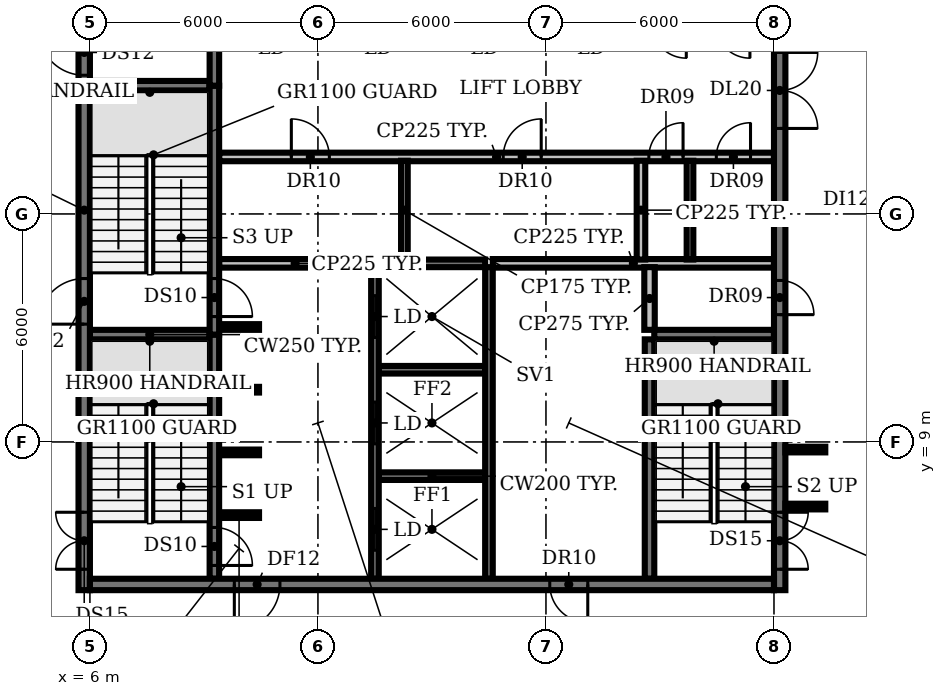
"""IFC4 building model, lengths in metres.
Left out: names, types, materials, properties, quantities, classifications, styles, units other than length and angle.
Written with IfcOpenShell. Run it as: python <this file> out.ifc"""

import sys

from ifc_helpers import new_model, si_unit, direction, frame, frame_2d, origin, place, context, subcontext, project, spatial, rectangle, extrude, element, fill, save


model = new_model("IFC4")
c1 = context("Model", 3, precision=1e-05, world=origin(), true_north=direction((0.0, 1.0)))
c2 = subcontext(c1, "Body", "Model", "MODEL_VIEW")
j1 = project(units=[si_unit("LENGTHUNIT", "METRE"), si_unit("PLANEANGLEUNIT", "RADIAN")], contexts=[c1])
p1 = place(None, origin())
s1 = spatial("IfcSite", under=j1, at=p1, CompositionType="ELEMENT")
p2 = place(p1, origin())
s2 = spatial("IfcBuilding", under=s1, at=p2, CompositionType="ELEMENT")
p3 = place(p2, frame((0.0, 0.0, 297.8)))
s3 = spatial("IfcBuildingStorey", under=s2, at=p3, CompositionType="ELEMENT", Elevation=297.8)
p4 = place(p3, frame((9.4, 7.075, 0.0), z_axis=(0.0, 0.0, 1.0), x_axis=(1.0, 0.0, 0.0)))
e1 = element("IfcWall", 1, at=p4, inside=s3, PredefinedType="SHEAR", context=c2, shape_type="SweptSolid", body=[
    extrude(rectangle(XDim=1.05, YDim=0.15, at=frame_2d((0.525, 0.0))), origin(), (0.0, 0.0, 1.0), 3.85),
])
p5 = place(p3, frame((13.6, 8.1, 0.0), z_axis=(0.0, 0.0, 1.0), x_axis=(1.0, 0.0, 0.0)))
e2 = element("IfcWall", 2, at=p5, inside=s3, PredefinedType="SHEAR", context=c2, shape_type="SweptSolid", body=[
    extrude(rectangle(XDim=2.8, YDim=0.2, at=frame_2d((1.4, 0.0))), origin(), (0.0, 0.0, 1.0), 3.85),
])
for number, where, z_axis, x_axis in (
    (3, (9.4, 8.725, 0.0), (0.0, 0.0, 1.0), (1.0, 0.0, 0.0)),
    (4, (9.4, 10.375, 0.0), (0.0, 0.0, 1.0), (1.0, 0.0, 0.0)),
):
    element("IfcWall", number, at=place(p3, frame(where, z_axis=z_axis, x_axis=x_axis)), inside=s3, PredefinedType="SHEAR", context=c2, shape_type="SweptSolid", body=[
        extrude(rectangle(XDim=1.05, YDim=0.15, at=frame_2d((0.525, 0.0))), origin(), (0.0, 0.0, 1.0), 3.85),
    ])
p6 = place(p3, frame((13.6, 10.9, 0.0), z_axis=(0.0, 0.0, 1.0), x_axis=(1.0, 0.0, 0.0)))
e5 = element("IfcWall", 5, at=p6, inside=s3, PredefinedType="SHEAR", context=c2, shape_type="SweptSolid", body=[
    extrude(rectangle(XDim=2.8, YDim=0.2, at=frame_2d((1.4, 0.0))), origin(), (0.0, 0.0, 1.0), 3.85),
])
for number, where, z_axis, x_axis in (
    (6, (6.0, 11.825, 0.0), (0.0, 0.0, 1.0), (1.0, 0.0, 0.0)),
    (7, (20.85, 11.825, 0.0), (0.0, 0.0, 1.0), (1.0, 0.0, 0.0)),
):
    element("IfcWall", number, at=place(p3, frame(where, z_axis=z_axis, x_axis=x_axis)), inside=s3, PredefinedType="SHEAR", context=c2, shape_type="SweptSolid", body=[
        extrude(rectangle(XDim=3.15, YDim=0.25, at=frame_2d((1.575, 0.0))), origin(), (0.0, 0.0, 1.0), 3.85),
    ])
p7 = place(p3, frame((9.4, 12.025, 0.0), z_axis=(0.0, 0.0, 1.0), x_axis=(1.0, 0.0, 0.0)))
e8 = element("IfcWall", 8, at=p7, inside=s3, PredefinedType="SHEAR", context=c2, shape_type="SweptSolid", body=[
    extrude(rectangle(XDim=1.05, YDim=0.15, at=frame_2d((0.525, 0.0))), origin(), (0.0, 0.0, 1.0), 3.85),
])
p8 = place(p3, frame((9.4, 13.7, 0.0), z_axis=(0.0, 0.0, 1.0), x_axis=(1.0, 0.0, 0.0)))
e9 = element("IfcWall", 9, at=p8, inside=s3, PredefinedType="PARTITIONING", context=c2, shape_type="SweptSolid", body=[
    extrude(rectangle(XDim=4.0, YDim=0.225, at=frame_2d((2.0, 0.0))), origin(), (0.0, 0.0, 1.0), 3.85),
])
p9 = place(p3, frame((13.6, 13.7, 0.0), z_axis=(0.0, 0.0, 1.0), x_axis=(1.0, 0.0, 0.0)))
e10 = element("IfcWall", 10, at=p9, inside=s3, PredefinedType="SHEAR", context=c2, shape_type="SweptSolid", body=[
    extrude(rectangle(XDim=2.8, YDim=0.2, at=frame_2d((1.4, 0.0))), origin(), (0.0, 0.0, 1.0), 3.85),
])
p10 = place(p3, frame((16.6, 13.7, 0.0), z_axis=(0.0, 0.0, 1.0), x_axis=(1.0, 0.0, 0.0)))
e11 = element("IfcWall", 11, at=p10, inside=s3, PredefinedType="PARTITIONING", context=c2, shape_type="SweptSolid", body=[
    extrude(rectangle(XDim=7.4, YDim=0.225, at=frame_2d((3.7, 0.0))), origin(), (0.0, 0.0, 1.0), 3.85),
])
p11 = place(p3, frame((9.4, 16.5, 0.0), z_axis=(0.0, 0.0, 1.0), x_axis=(1.0, 0.0, 0.0)))
e12 = element("IfcWall", 12, at=p11, inside=s3, PredefinedType="PARTITIONING", context=c2, shape_type="SweptSolid", body=[
    extrude(rectangle(XDim=14.6, YDim=0.225, at=frame_2d((7.3, 0.0))), origin(), (0.0, 0.0, 1.0), 3.85),
])
p12 = place(p11, frame((1.9, 0.0, 0.0)))
e13 = element("IfcOpeningElement", 13, at=p12, cuts=e12, PredefinedType="OPENING", context=c2, shape_type="SweptSolid", body=[
    extrude(rectangle(XDim=1.0, YDim=2.1, at=frame_2d((0.5, 1.05))), frame((0.0, 0.123, 0.0), z_axis=(0.0, -1.0, 0.0), x_axis=(1.0, 0.0, 0.0)), (0.0, 0.0, 1.0), 0.245),
])
p13 = place(p11, frame((7.475, 0.0, 0.0)))
e14 = element("IfcOpeningElement", 14, at=p13, cuts=e12, PredefinedType="OPENING", context=c2, shape_type="SweptSolid", body=[
    extrude(rectangle(XDim=1.0, YDim=2.1, at=frame_2d((0.5, 1.05))), frame((0.0, 0.123, 0.0), z_axis=(0.0, -1.0, 0.0), x_axis=(1.0, 0.0, 0.0)), (0.0, 0.0, 1.0), 0.245),
])
p14 = place(p11, frame((11.308, 0.0, 0.0)))
e15 = element("IfcOpeningElement", 15, at=p14, cuts=e12, PredefinedType="OPENING", context=c2, shape_type="SweptSolid", body=[
    extrude(rectangle(XDim=0.9, YDim=2.1, at=frame_2d((0.45, 1.05))), frame((0.0, 0.123, 0.0), z_axis=(0.0, -1.0, 0.0), x_axis=(1.0, 0.0, 0.0)), (0.0, 0.0, 1.0), 0.245),
])
p15 = place(p11, frame((13.083, 0.0, 0.0)))
e16 = element("IfcOpeningElement", 16, at=p15, cuts=e12, PredefinedType="OPENING", context=c2, shape_type="SweptSolid", body=[
    extrude(rectangle(XDim=0.9, YDim=2.1, at=frame_2d((0.45, 1.05))), frame((0.0, 0.123, 0.0), z_axis=(0.0, -1.0, 0.0), x_axis=(1.0, 0.0, 0.0)), (0.0, 0.0, 1.0), 0.245),
])
p16 = place(p3, frame((6.0, 18.375, 0.0), z_axis=(0.0, 0.0, 1.0), x_axis=(1.0, 0.0, 0.0)))
e17 = element("IfcWall", 17, at=p16, inside=s3, PredefinedType="SHEAR", context=c2, shape_type="SweptSolid", body=[
    extrude(rectangle(XDim=3.15, YDim=0.25, at=frame_2d((1.575, 0.0))), origin(), (0.0, 0.0, 1.0), 3.85),
])
p17 = place(p3, frame((9.275, 11.825, 0.0), z_axis=(0.0, 0.0, 1.0), x_axis=(0.0, -1.0, 0.0)))
e18 = element("IfcWall", 18, at=p17, inside=s3, PredefinedType="SHEAR", context=c2, shape_type="SweptSolid", body=[
    extrude(rectangle(XDim=6.425, YDim=0.25, at=frame_2d((3.212, 0.0))), origin(), (0.0, 0.0, 1.0), 3.85),
])
p18 = place(p17, frame((5.075, 0.0, 0.0)))
e19 = element("IfcOpeningElement", 19, at=p18, cuts=e18, PredefinedType="OPENING", context=c2, shape_type="SweptSolid", body=[
    extrude(rectangle(XDim=1.0, YDim=2.1, at=frame_2d((0.5, 1.05))), frame((0.0, 0.135, 0.0), z_axis=(0.0, -1.0, 0.0), x_axis=(1.0, 0.0, 0.0)), (0.0, 0.0, 1.0), 0.27),
])
p19 = place(p3, frame((9.275, 18.375, 0.0), z_axis=(0.0, 0.0, 1.0), x_axis=(0.0, -1.0, 0.0)))
e20 = element("IfcWall", 20, at=p19, inside=s3, PredefinedType="SHEAR", context=c2, shape_type="SweptSolid", body=[
    extrude(rectangle(XDim=6.55, YDim=0.25, at=frame_2d((3.275, 0.0))), origin(), (0.0, 0.0, 1.0), 3.85),
])
p20 = place(p19, frame((5.075, 0.0, 0.0)))
e21 = element("IfcOpeningElement", 21, at=p20, cuts=e20, PredefinedType="OPENING", context=c2, shape_type="SweptSolid", body=[
    extrude(rectangle(XDim=1.0, YDim=2.1, at=frame_2d((0.5, 1.05))), frame((0.0, 0.135, 0.0), z_axis=(0.0, -1.0, 0.0), x_axis=(1.0, 0.0, 0.0)), (0.0, 0.0, 1.0), 0.27),
])
p21 = place(p3, frame((9.275, 18.375, 0.0), z_axis=(0.0, 0.0, 1.0), x_axis=(0.0, 1.0, 0.0)))
e22 = element("IfcWall", 22, at=p21, inside=s3, PredefinedType="SHEAR", context=c2, shape_type="SweptSolid", body=[
    extrude(rectangle(XDim=6.425, YDim=0.25, at=frame_2d((3.212, 0.0))), origin(), (0.0, 0.0, 1.0), 3.85),
])
p22 = place(p3, frame((13.5, 5.4, 0.0), z_axis=(0.0, 0.0, 1.0), x_axis=(0.0, 1.0, 0.0)))
e23 = element("IfcWall", 23, at=p22, inside=s3, PredefinedType="SHEAR", context=c2, shape_type="SweptSolid", body=[
    extrude(rectangle(XDim=8.2, YDim=0.2, at=frame_2d((4.1, 0.0))), origin(), (0.0, 0.0, 1.0), 3.85),
])
p23 = place(p22, frame((0.75, 0.0, 0.0)))
e24 = element("IfcOpeningElement", 24, at=p23, cuts=e23, PredefinedType="OPENING", context=c2, shape_type="SweptSolid", body=[
    extrude(rectangle(XDim=1.1, YDim=2.1, at=frame_2d((0.55, 1.05))), frame((0.0, 0.11, 0.0), z_axis=(0.0, -1.0, 0.0), x_axis=(1.0, 0.0, 0.0)), (0.0, 0.0, 1.0), 0.22),
])
p24 = place(p22, frame((3.55, 0.0, 0.0)))
e25 = element("IfcOpeningElement", 25, at=p24, cuts=e23, PredefinedType="OPENING", context=c2, shape_type="SweptSolid", body=[
    extrude(rectangle(XDim=1.1, YDim=2.1, at=frame_2d((0.55, 1.05))), frame((0.0, 0.11, 0.0), z_axis=(0.0, -1.0, 0.0), x_axis=(1.0, 0.0, 0.0)), (0.0, 0.0, 1.0), 0.22),
])
p25 = place(p22, frame((6.35, 0.0, 0.0)))
e26 = element("IfcOpeningElement", 26, at=p25, cuts=e23, PredefinedType="OPENING", context=c2, shape_type="SweptSolid", body=[
    extrude(rectangle(XDim=1.1, YDim=2.1, at=frame_2d((0.55, 1.05))), frame((0.0, 0.11, 0.0), z_axis=(0.0, -1.0, 0.0), x_axis=(1.0, 0.0, 0.0)), (0.0, 0.0, 1.0), 0.22),
])
p26 = place(p3, frame((14.275, 13.8, 0.0), z_axis=(0.0, 0.0, 1.0), x_axis=(0.0, 1.0, 0.0)))
e27 = element("IfcWall", 27, at=p26, inside=s3, PredefinedType="PARTITIONING", context=c2, shape_type="SweptSolid", body=[
    extrude(rectangle(XDim=2.6, YDim=0.175, at=frame_2d((1.3, 0.0))), origin(), (0.0, 0.0, 1.0), 3.85),
])
p27 = place(p3, frame((16.5, 5.4, 0.0), z_axis=(0.0, 0.0, 1.0), x_axis=(0.0, 1.0, 0.0)))
e28 = element("IfcWall", 28, at=p27, inside=s3, PredefinedType="SHEAR", context=c2, shape_type="SweptSolid", body=[
    extrude(rectangle(XDim=8.2, YDim=0.2, at=frame_2d((4.1, 0.0))), origin(), (0.0, 0.0, 1.0), 3.85),
])
p28 = place(p3, frame((20.5, 13.8, 0.0), z_axis=(0.0, 0.0, 1.0), x_axis=(0.0, 1.0, 0.0)))
e29 = element("IfcWall", 29, at=p28, inside=s3, PredefinedType="PARTITIONING", context=c2, shape_type="SweptSolid", body=[
    extrude(rectangle(XDim=2.6, YDim=0.225, at=frame_2d((1.3, 0.0))), origin(), (0.0, 0.0, 1.0), 3.85),
])
p29 = place(p3, frame((20.725, 5.4, 0.0), z_axis=(0.0, 0.0, 1.0), x_axis=(0.0, 1.0, 0.0)))
e30 = element("IfcWall", 30, at=p29, inside=s3, PredefinedType="SHEAR", context=c2, shape_type="SweptSolid", body=[
    extrude(rectangle(XDim=6.3, YDim=0.25, at=frame_2d((3.15, 0.0))), origin(), (0.0, 0.0, 1.0), 3.85),
])
p30 = place(p3, frame((20.725, 11.95, 0.0), z_axis=(0.0, 0.0, 1.0), x_axis=(0.0, 1.0, 0.0)))
e31 = element("IfcWall", 31, at=p30, inside=s3, PredefinedType="PARTITIONING", context=c2, shape_type="SweptSolid", body=[
    extrude(rectangle(XDim=1.65, YDim=0.275, at=frame_2d((0.825, 0.0))), origin(), (0.0, 0.0, 1.0), 3.85),
])
p31 = place(p3, frame((21.79, 13.8, 0.0), z_axis=(0.0, 0.0, 1.0), x_axis=(0.0, 1.0, 0.0)))
e32 = element("IfcWall", 32, at=p31, inside=s3, PredefinedType="PARTITIONING", context=c2, shape_type="SweptSolid", body=[
    extrude(rectangle(XDim=2.6, YDim=0.175, at=frame_2d((1.3, 0.0))), origin(), (0.0, 0.0, 1.0), 3.85),
])
p32 = place(p3, frame((5.85, 5.1, 0.0), z_axis=(0.0, 0.0, 1.0), x_axis=(0.0, 1.0, 0.0)))
e33 = element("IfcWall", 33, at=p32, inside=s3, PredefinedType="SHEAR", context=c2, shape_type="SweptSolid", body=[
    extrude(rectangle(XDim=20.0, YDim=0.3, at=frame_2d((10.0, 0.0))), origin(), (0.0, 0.0, 1.0), 3.85),
])
p33 = place(p32, frame((0.55, 0.0, 0.0)))
e34 = element("IfcOpeningElement", 34, at=p33, cuts=e33, PredefinedType="OPENING", context=c2, shape_type="SweptSolid", body=[
    extrude(rectangle(XDim=1.5, YDim=2.1, at=frame_2d((0.75, 1.05))), frame((0.0, 0.16, 0.0), z_axis=(0.0, -1.0, 0.0), x_axis=(1.0, 0.0, 0.0)), (0.0, 0.0, 1.0), 0.32),
])
p34 = place(p32, frame((7.0, 0.0, 0.0)))
e35 = element("IfcOpeningElement", 35, at=p34, cuts=e33, PredefinedType="OPENING", context=c2, shape_type="SweptSolid", body=[
    extrude(rectangle(XDim=1.2, YDim=2.1, at=frame_2d((0.6, 1.05))), frame((0.0, 0.16, 0.0), z_axis=(0.0, -1.0, 0.0), x_axis=(1.0, 0.0, 0.0)), (0.0, 0.0, 1.0), 0.32),
])
p35 = place(p32, frame((13.55, 0.0, 0.0)))
e36 = element("IfcOpeningElement", 36, at=p35, cuts=e33, PredefinedType="OPENING", context=c2, shape_type="SweptSolid", body=[
    extrude(rectangle(XDim=1.2, YDim=2.1, at=frame_2d((0.6, 1.05))), frame((0.0, 0.16, 0.0), z_axis=(0.0, -1.0, 0.0), x_axis=(1.0, 0.0, 0.0)), (0.0, 0.0, 1.0), 0.32),
])
p36 = place(p3, frame((24.15, 25.655, 0.0), z_axis=(0.0, 0.0, 1.0), x_axis=(0.0, -1.0, 0.0)))
e37 = element("IfcWall", 37, at=p36, inside=s3, PredefinedType="SHEAR", context=c2, shape_type="SweptSolid", body=[
    extrude(rectangle(XDim=20.555, YDim=0.3, at=frame_2d((10.277, 0.0))), origin(), (0.0, 0.0, 1.0), 3.85),
])
p37 = place(p36, frame((18.505, 0.0, 0.0)))
e38 = element("IfcOpeningElement", 38, at=p37, cuts=e37, PredefinedType="OPENING", context=c2, shape_type="SweptSolid", body=[
    extrude(rectangle(XDim=1.5, YDim=2.1, at=frame_2d((0.75, 1.05))), frame((0.0, 0.16, 0.0), z_axis=(0.0, -1.0, 0.0), x_axis=(1.0, 0.0, 0.0)), (0.0, 0.0, 1.0), 0.32),
])
p38 = place(p36, frame((12.405, 0.0, 0.0)))
e39 = element("IfcOpeningElement", 39, at=p38, cuts=e37, PredefinedType="OPENING", context=c2, shape_type="SweptSolid", body=[
    extrude(rectangle(XDim=0.9, YDim=2.1, at=frame_2d((0.45, 1.05))), frame((0.0, 0.16, 0.0), z_axis=(0.0, -1.0, 0.0), x_axis=(1.0, 0.0, 0.0)), (0.0, 0.0, 1.0), 0.32),
])
p39 = place(p36, frame((6.405, 0.0, 0.0)))
e40 = element("IfcOpeningElement", 40, at=p39, cuts=e37, PredefinedType="OPENING", context=c2, shape_type="SweptSolid", body=[
    extrude(rectangle(XDim=2.0, YDim=2.1, at=frame_2d((1.0, 1.05))), frame((0.0, 0.16, 0.0), z_axis=(0.0, -1.0, 0.0), x_axis=(1.0, 0.0, 0.0)), (0.0, 0.0, 1.0), 0.32),
])
p40 = place(p3, frame((24.0, 5.25, 0.0), z_axis=(0.0, 0.0, 1.0), x_axis=(-1.0, 0.0, 0.0)))
e41 = element("IfcWall", 41, at=p40, inside=s3, PredefinedType="SHEAR", context=c2, shape_type="SweptSolid", body=[
    extrude(rectangle(XDim=18.0, YDim=0.3, at=frame_2d((9.0, 0.0))), origin(), (0.0, 0.0, 1.0), 3.85),
])
p41 = place(p40, frame((13.0, 0.0, 0.0)))
e42 = element("IfcOpeningElement", 42, at=p41, cuts=e41, PredefinedType="OPENING", context=c2, shape_type="SweptSolid", body=[
    extrude(rectangle(XDim=1.2, YDim=2.1, at=frame_2d((0.6, 1.05))), frame((0.0, 0.16, 0.0), z_axis=(0.0, -1.0, 0.0), x_axis=(1.0, 0.0, 0.0)), (0.0, 0.0, 1.0), 0.32),
])
p42 = place(p40, frame((4.9, 0.0, 0.0)))
e43 = element("IfcOpeningElement", 43, at=p42, cuts=e41, PredefinedType="OPENING", context=c2, shape_type="SweptSolid", body=[
    extrude(rectangle(XDim=1.0, YDim=2.1, at=frame_2d((0.5, 1.05))), frame((0.0, 0.16, 0.0), z_axis=(0.0, -1.0, 0.0), x_axis=(1.0, 0.0, 0.0)), (0.0, 0.0, 1.0), 0.32),
])
for number, where, z_axis, x_axis in (
    (44, (24.3, 7.3, 0.0), (0.0, 0.0, 1.0), (1.0, 0.0, 0.0)),
    (45, (24.3, 8.8, 0.0), (0.0, 0.0, 1.0), (1.0, 0.0, 0.0)),
):
    element("IfcWall", number, at=place(p3, frame(where, z_axis=z_axis, x_axis=x_axis)), inside=s3, PredefinedType="PARTITIONING", context=c2, shape_type="SweptSolid", body=[
        extrude(rectangle(XDim=1.05, YDim=0.15, at=frame_2d((0.525, 0.0))), origin(), (0.0, 0.0, 1.0), 2.9),
    ])
p43 = place(p12, origin())
e46 = element("IfcDoor", 46, at=p43, inside=s3, OperationType="SINGLE_SWING_LEFT", PredefinedType="DOOR", context=c2, shape_type="SweptSolid", body=[
    extrude(rectangle(XDim=1.0, YDim=2.1, at=frame_2d((0.5, 1.05))), frame((0.0, 0.025, 0.0), z_axis=(0.0, -1.0, 0.0), x_axis=(1.0, 0.0, 0.0)), (0.0, 0.0, 1.0), 0.05),
])
fill(e13, e46)
p44 = place(p13, origin())
e47 = element("IfcDoor", 47, at=p44, inside=s3, OperationType="SINGLE_SWING_RIGHT", PredefinedType="DOOR", context=c2, shape_type="SweptSolid", body=[
    extrude(rectangle(XDim=1.0, YDim=2.1, at=frame_2d((0.5, 1.05))), frame((0.0, 0.025, 0.0), z_axis=(0.0, -1.0, 0.0), x_axis=(1.0, 0.0, 0.0)), (0.0, 0.0, 1.0), 0.05),
])
fill(e14, e47)
p45 = place(p14, origin())
e48 = element("IfcDoor", 48, at=p45, inside=s3, OperationType="SINGLE_SWING_RIGHT", PredefinedType="DOOR", context=c2, shape_type="SweptSolid", body=[
    extrude(rectangle(XDim=0.9, YDim=2.1, at=frame_2d((0.45, 1.05))), frame((0.0, 0.025, 0.0), z_axis=(0.0, -1.0, 0.0), x_axis=(1.0, 0.0, 0.0)), (0.0, 0.0, 1.0), 0.05),
])
fill(e15, e48)
p46 = place(p15, origin())
e49 = element("IfcDoor", 49, at=p46, inside=s3, OperationType="SINGLE_SWING_RIGHT", PredefinedType="DOOR", context=c2, shape_type="SweptSolid", body=[
    extrude(rectangle(XDim=0.9, YDim=2.1, at=frame_2d((0.45, 1.05))), frame((0.0, 0.025, 0.0), z_axis=(0.0, -1.0, 0.0), x_axis=(1.0, 0.0, 0.0)), (0.0, 0.0, 1.0), 0.05),
])
fill(e16, e49)
p47 = place(p18, origin())
e50 = element("IfcDoor", 50, at=p47, inside=s3, OperationType="SINGLE_SWING_RIGHT", PredefinedType="DOOR", context=c2, shape_type="SweptSolid", body=[
    extrude(rectangle(XDim=1.0, YDim=2.1, at=frame_2d((0.5, 1.05))), frame((0.0, 0.025, 0.0), z_axis=(0.0, -1.0, 0.0), x_axis=(1.0, 0.0, 0.0)), (0.0, 0.0, 1.0), 0.05),
])
fill(e19, e50)
p48 = place(p20, origin())
e51 = element("IfcDoor", 51, at=p48, inside=s3, OperationType="SINGLE_SWING_RIGHT", PredefinedType="DOOR", context=c2, shape_type="SweptSolid", body=[
    extrude(rectangle(XDim=1.0, YDim=2.1, at=frame_2d((0.5, 1.05))), frame((0.0, 0.025, 0.0), z_axis=(0.0, -1.0, 0.0), x_axis=(1.0, 0.0, 0.0)), (0.0, 0.0, 1.0), 0.05),
])
fill(e21, e51)
p49 = place(p23, origin())
e52 = element("IfcDoor", 52, at=p49, inside=s3, OperationType="DOUBLE_DOOR_SLIDING", PredefinedType="DOOR", context=c2, shape_type="SweptSolid", body=[
    extrude(rectangle(XDim=1.1, YDim=2.1, at=frame_2d((0.55, 1.05))), frame((0.0, 0.025, 0.0), z_axis=(0.0, -1.0, 0.0), x_axis=(1.0, 0.0, 0.0)), (0.0, 0.0, 1.0), 0.05),
])
fill(e24, e52)
p50 = place(p24, origin())
e53 = element("IfcDoor", 53, at=p50, inside=s3, OperationType="DOUBLE_DOOR_SLIDING", PredefinedType="DOOR", context=c2, shape_type="SweptSolid", body=[
    extrude(rectangle(XDim=1.1, YDim=2.1, at=frame_2d((0.55, 1.05))), frame((0.0, 0.025, 0.0), z_axis=(0.0, -1.0, 0.0), x_axis=(1.0, 0.0, 0.0)), (0.0, 0.0, 1.0), 0.05),
])
fill(e25, e53)
p51 = place(p25, origin())
e54 = element("IfcDoor", 54, at=p51, inside=s3, OperationType="DOUBLE_DOOR_SLIDING", PredefinedType="DOOR", context=c2, shape_type="SweptSolid", body=[
    extrude(rectangle(XDim=1.1, YDim=2.1, at=frame_2d((0.55, 1.05))), frame((0.0, 0.025, 0.0), z_axis=(0.0, -1.0, 0.0), x_axis=(1.0, 0.0, 0.0)), (0.0, 0.0, 1.0), 0.05),
])
fill(e26, e54)
p52 = place(p33, origin())
e55 = element("IfcDoor", 55, at=p52, inside=s3, OperationType="DOUBLE_DOOR_SINGLE_SWING", PredefinedType="DOOR", context=c2, shape_type="SweptSolid", body=[
    extrude(rectangle(XDim=1.5, YDim=2.1, at=frame_2d((0.75, 1.05))), frame((0.0, 0.025, 0.0), z_axis=(0.0, -1.0, 0.0), x_axis=(1.0, 0.0, 0.0)), (0.0, 0.0, 1.0), 0.05),
])
fill(e34, e55)
p53 = place(p34, origin())
e56 = element("IfcDoor", 56, at=p53, inside=s3, OperationType="SINGLE_SWING_LEFT", PredefinedType="DOOR", context=c2, shape_type="SweptSolid", body=[
    extrude(rectangle(XDim=1.2, YDim=2.1, at=frame_2d((0.6, 1.05))), frame((0.0, 0.025, 0.0), z_axis=(0.0, -1.0, 0.0), x_axis=(1.0, 0.0, 0.0)), (0.0, 0.0, 1.0), 0.05),
])
fill(e35, e56)
p54 = place(p35, origin())
e57 = element("IfcDoor", 57, at=p54, inside=s3, OperationType="SINGLE_SWING_RIGHT", PredefinedType="DOOR", context=c2, shape_type="SweptSolid", body=[
    extrude(rectangle(XDim=1.2, YDim=2.1, at=frame_2d((0.6, 1.05))), frame((0.0, 0.025, 0.0), z_axis=(0.0, -1.0, 0.0), x_axis=(1.0, 0.0, 0.0)), (0.0, 0.0, 1.0), 0.05),
])
fill(e36, e57)
p55 = place(p37, origin())
e58 = element("IfcDoor", 58, at=p55, inside=s3, OperationType="DOUBLE_DOOR_SINGLE_SWING", PredefinedType="DOOR", context=c2, shape_type="SweptSolid", body=[
    extrude(rectangle(XDim=1.5, YDim=2.1, at=frame_2d((0.75, 1.05))), frame((0.0, 0.025, 0.0), z_axis=(0.0, -1.0, 0.0), x_axis=(1.0, 0.0, 0.0)), (0.0, 0.0, 1.0), 0.05),
])
fill(e38, e58)
p56 = place(p38, origin())
e59 = element("IfcDoor", 59, at=p56, inside=s3, OperationType="SINGLE_SWING_RIGHT", PredefinedType="DOOR", context=c2, shape_type="SweptSolid", body=[
    extrude(rectangle(XDim=0.9, YDim=2.1, at=frame_2d((0.45, 1.05))), frame((0.0, 0.025, 0.0), z_axis=(0.0, -1.0, 0.0), x_axis=(1.0, 0.0, 0.0)), (0.0, 0.0, 1.0), 0.05),
])
fill(e39, e59)
p57 = place(p39, origin())
e60 = element("IfcDoor", 60, at=p57, inside=s3, OperationType="DOUBLE_DOOR_SINGLE_SWING", PredefinedType="DOOR", context=c2, shape_type="SweptSolid", body=[
    extrude(rectangle(XDim=2.0, YDim=2.1, at=frame_2d((1.0, 1.05))), frame((0.0, 0.025, 0.0), z_axis=(0.0, -1.0, 0.0), x_axis=(1.0, 0.0, 0.0)), (0.0, 0.0, 1.0), 0.05),
])
fill(e40, e60)
p58 = place(p41, origin())
e61 = element("IfcDoor", 61, at=p58, inside=s3, OperationType="SINGLE_SWING_RIGHT", PredefinedType="DOOR", context=c2, shape_type="SweptSolid", body=[
    extrude(rectangle(XDim=1.2, YDim=2.1, at=frame_2d((0.6, 1.05))), frame((0.0, 0.025, 0.0), z_axis=(0.0, -1.0, 0.0), x_axis=(1.0, 0.0, 0.0)), (0.0, 0.0, 1.0), 0.05),
])
fill(e42, e61)
p59 = place(p42, origin())
e62 = element("IfcDoor", 62, at=p59, inside=s3, OperationType="SINGLE_SWING_LEFT", PredefinedType="DOOR", context=c2, shape_type="SweptSolid", body=[
    extrude(rectangle(XDim=1.0, YDim=2.1, at=frame_2d((0.5, 1.05))), frame((0.0, 0.025, 0.0), z_axis=(0.0, -1.0, 0.0), x_axis=(1.0, 0.0, 0.0)), (0.0, 0.0, 1.0), 0.05),
])
fill(e43, e62)
save(model, sys.argv[1])
